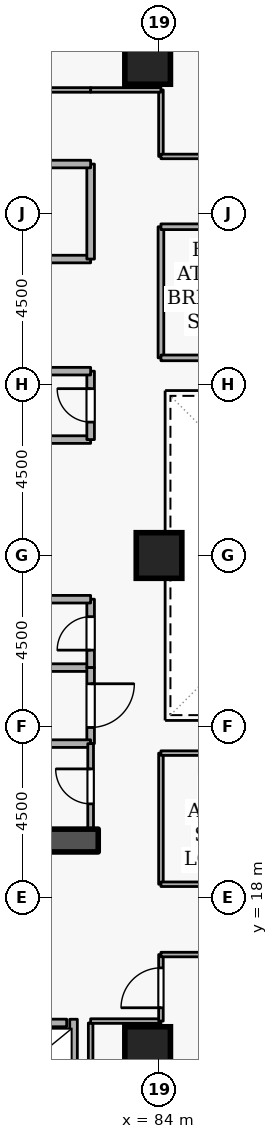
"""IFC4 building model, lengths in metres.
Left out: names, types, materials, properties, quantities, classifications, styles, units other than length and angle.
Written with IfcOpenShell. Run it as: python <this file> out.ifc"""

import sys

from ifc_helpers import new_model, si_unit, direction, frame, frame_2d, origin, origin_2d, place, context, subcontext, project, spatial, rectangle, extrude, element, fill, save


model = new_model("IFC4")
c1 = context("Model", 3, precision=1e-05, world=origin(), true_north=direction((0.0, 1.0)))
c2 = subcontext(c1, "Body", "Model", "MODEL_VIEW")
j1 = project(units=[si_unit("LENGTHUNIT", "METRE"), si_unit("PLANEANGLEUNIT", "RADIAN")], contexts=[c1])
p1 = place(None, origin())
s1 = spatial("IfcSite", under=j1, at=p1, CompositionType="ELEMENT")
p2 = place(p1, origin())
s2 = spatial("IfcBuilding", under=s1, at=p2, CompositionType="ELEMENT")
p3 = place(p2, frame((0.0, 0.0, 112.5)))
s3 = spatial("IfcBuildingStorey", under=s2, at=p3, CompositionType="ELEMENT", Elevation=112.5)
p4 = place(p3, frame((76.7, 19.5, 0.0), z_axis=(0.0, 0.0, 1.0), x_axis=(1.0, 0.0, 0.0)))
e1 = element("IfcWall", 1, at=p4, inside=s3, PredefinedType="SHEAR", context=c2, shape_type="SweptSolid", body=[
    extrude(rectangle(XDim=5.7, YDim=0.6, at=frame_2d((2.85, 0.0))), origin(), (0.0, 0.0, 1.0), 3.6),
])
for number, where, z_axis, x_axis in (
    (2, (83.7, 14.0, 0.0), (0.0, 0.0, 1.0), (1.0, 0.0, 0.0)),
    (3, (83.7, 40.0, 0.0), (0.0, 0.0, 1.0), (1.0, 0.0, 0.0)),
    (4, (84.0, 27.0, 0.0), (0.0, 0.0, 1.0), (1.0, 0.0, 0.0)),
):
    element("IfcColumn", number, at=place(p3, frame(where, z_axis=z_axis, x_axis=x_axis)), inside=s3, PredefinedType="COLUMN", context=c2, shape_type="SweptSolid", body=[
        extrude(rectangle(XDim=1.2, YDim=1.2, at=origin_2d()), origin(), (0.0, 0.0, 1.0), 3.6),
    ])
p5 = place(p3, frame((79.63, 14.7, 0.0), z_axis=(0.0, 0.0, 1.0), x_axis=(1.0, 0.0, 0.0)))
e5 = element("IfcWall", 5, at=p5, inside=s3, PredefinedType="STANDARD", context=c2, shape_type="SweptSolid", body=[
    extrude(rectangle(XDim=1.94, YDim=0.2, at=frame_2d((0.97, 0.0))), origin(), (0.0, 0.0, 1.0), 3.34),
])
p6 = place(p5, frame((0.46, 0.0, 0.0)))
e6 = element("IfcOpeningElement", 6, at=p6, cuts=e5, PredefinedType="OPENING", context=c2, shape_type="SweptSolid", body=[
    extrude(rectangle(XDim=1.02, YDim=2.06, at=frame_2d((0.51, 1.03))), frame((0.0, 0.11, 0.0), z_axis=(0.0, -1.0, 0.0), x_axis=(1.0, 0.0, 0.0)), (0.0, 0.0, 1.0), 0.22),
])
p7 = place(p3, frame((81.75, 12.612, 0.0), z_axis=(0.0, 0.0, 1.0), x_axis=(0.0, 1.0, 0.0)))
e7 = element("IfcWall", 7, at=p7, inside=s3, PredefinedType="STANDARD", context=c2, shape_type="SweptSolid", body=[
    extrude(rectangle(XDim=2.186, YDim=0.2, at=frame_2d((1.093, 0.0))), origin(), (0.0, 0.0, 1.0), 3.34),
])
p8 = place(p3, frame((79.9, 34.8, 0.0), z_axis=(0.0, 0.0, 1.0), x_axis=(1.0, 0.0, 0.0)))
e8 = element("IfcWall", 8, at=p8, inside=s3, PredefinedType="STANDARD", context=c2, shape_type="SweptSolid", body=[
    extrude(rectangle(XDim=2.3, YDim=0.2, at=frame_2d((1.15, 0.0))), origin(), (0.0, 0.0, 1.0), 2.545),
])
p9 = place(p3, frame((82.2, 34.8, 0.0), z_axis=(0.0, 0.0, 1.0), x_axis=(0.0, 1.0, 0.0)))
e9 = element("IfcWall", 9, at=p9, inside=s3, PredefinedType="STANDARD", context=c2, shape_type="SweptSolid", body=[
    extrude(rectangle(XDim=2.5, YDim=0.2, at=frame_2d((1.25, 0.0))), origin(), (0.0, 0.0, 1.0), 3.34),
])
p10 = place(p3, frame((82.2, 37.3, 0.0), z_axis=(0.0, 0.0, 1.0), x_axis=(-1.0, 0.0, 0.0)))
e10 = element("IfcWall", 10, at=p10, inside=s3, PredefinedType="STANDARD", context=c2, shape_type="SweptSolid", body=[
    extrude(rectangle(XDim=5.7, YDim=0.2, at=frame_2d((2.85, 0.0))), origin(), (0.0, 0.0, 1.0), 3.34),
])
p11 = place(p10, frame((2.275, 0.0, 0.0)))
e11 = element("IfcOpeningElement", 11, at=p11, cuts=e10, PredefinedType="OPENING", context=c2, shape_type="SweptSolid", body=[
    extrude(rectangle(XDim=1.15, YDim=2.1, at=frame_2d((0.575, 1.05))), frame((0.0, 0.11, 0.0), z_axis=(0.0, -1.0, 0.0), x_axis=(1.0, 0.0, 0.0)), (0.0, 0.0, 1.0), 0.22),
])
p12 = place(p3, frame((80.15, 24.05, 0.0), z_axis=(0.0, 0.0, 1.0), x_axis=(1.0, 0.0, 0.0)))
e12 = element("IfcWall", 12, at=p12, inside=s3, PredefinedType="STANDARD", context=c2, shape_type="SweptSolid", body=[
    extrude(rectangle(XDim=2.05, YDim=0.2, at=frame_2d((1.025, 0.0))), origin(), (0.0, 0.0, 1.0), 3.34),
])
p13 = place(p3, frame((82.2, 24.05, 0.0), z_axis=(0.0, 0.0, 1.0), x_axis=(0.0, 1.0, 0.0)))
e13 = element("IfcWall", 13, at=p13, inside=s3, PredefinedType="STANDARD", context=c2, shape_type="SweptSolid", body=[
    extrude(rectangle(XDim=1.8, YDim=0.2, at=frame_2d((0.9, 0.0))), origin(), (0.0, 0.0, 1.0), 3.34),
])
p14 = place(p13, frame((0.46, 0.0, 0.0)))
e14 = element("IfcOpeningElement", 14, at=p14, cuts=e13, PredefinedType="OPENING", context=c2, shape_type="SweptSolid", body=[
    extrude(rectangle(XDim=0.88, YDim=2.04, at=frame_2d((0.44, 1.02))), frame((0.0, 0.11, 0.0), z_axis=(0.0, -1.0, 0.0), x_axis=(1.0, 0.0, 0.0)), (0.0, 0.0, 1.0), 0.22),
])
for number, where, z_axis, x_axis in (
    (15, (82.2, 25.85, 0.0), (0.0, 0.0, 1.0), (-1.0, 0.0, 0.0)),
    (16, (80.15, 30.05, 0.0), (0.0, 0.0, 1.0), (1.0, 0.0, 0.0)),
):
    element("IfcWall", number, at=place(p3, frame(where, z_axis=z_axis, x_axis=x_axis)), inside=s3, PredefinedType="STANDARD", context=c2, shape_type="SweptSolid", body=[
        extrude(rectangle(XDim=2.05, YDim=0.2, at=frame_2d((1.025, 0.0))), origin(), (0.0, 0.0, 1.0), 3.34),
    ])
p15 = place(p3, frame((82.2, 30.05, 0.0), z_axis=(0.0, 0.0, 1.0), x_axis=(0.0, 1.0, 0.0)))
e17 = element("IfcWall", 17, at=p15, inside=s3, PredefinedType="STANDARD", context=c2, shape_type="SweptSolid", body=[
    extrude(rectangle(XDim=1.8, YDim=0.2, at=frame_2d((0.9, 0.0))), origin(), (0.0, 0.0, 1.0), 3.34),
])
p16 = place(p15, frame((0.46, 0.0, 0.0)))
e18 = element("IfcOpeningElement", 18, at=p16, cuts=e17, PredefinedType="OPENING", context=c2, shape_type="SweptSolid", body=[
    extrude(rectangle(XDim=0.88, YDim=2.04, at=frame_2d((0.44, 1.02))), frame((0.0, 0.11, 0.0), z_axis=(0.0, -1.0, 0.0), x_axis=(1.0, 0.0, 0.0)), (0.0, 0.0, 1.0), 0.22),
])
p17 = place(p3, frame((82.2, 31.85, 0.0), z_axis=(0.0, 0.0, 1.0), x_axis=(-1.0, 0.0, 0.0)))
e19 = element("IfcWall", 19, at=p17, inside=s3, PredefinedType="STANDARD", context=c2, shape_type="SweptSolid", body=[
    extrude(rectangle(XDim=2.05, YDim=0.2, at=frame_2d((1.025, 0.0))), origin(), (0.0, 0.0, 1.0), 3.34),
])
p18 = place(p3, frame((82.2, 24.05, 0.0), z_axis=(0.0, 0.0, 1.0), x_axis=(0.0, -1.0, 0.0)))
e20 = element("IfcWall", 20, at=p18, inside=s3, PredefinedType="STANDARD", context=c2, shape_type="SweptSolid", body=[
    extrude(rectangle(XDim=2.0, YDim=0.2, at=frame_2d((1.0, 0.0))), origin(), (0.0, 0.0, 1.0), 3.34),
])
p19 = place(p18, frame((0.425, 0.0, 0.0)))
e21 = element("IfcOpeningElement", 21, at=p19, cuts=e20, PredefinedType="OPENING", context=c2, shape_type="SweptSolid", body=[
    extrude(rectangle(XDim=1.15, YDim=2.1, at=frame_2d((0.575, 1.05))), frame((0.0, 0.11, 0.0), z_axis=(0.0, -1.0, 0.0), x_axis=(1.0, 0.0, 0.0)), (0.0, 0.0, 1.0), 0.22),
])
p20 = place(p3, frame((82.2, 22.05, 0.0), z_axis=(0.0, 0.0, 1.0), x_axis=(-1.0, 0.0, 0.0)))
e22 = element("IfcWall", 22, at=p20, inside=s3, PredefinedType="STANDARD", context=c2, shape_type="SweptSolid", body=[
    extrude(rectangle(XDim=2.05, YDim=0.2, at=frame_2d((1.025, 0.0))), origin(), (0.0, 0.0, 1.0), 3.34),
])
p21 = place(p3, frame((82.2, 19.8, 0.0), z_axis=(0.0, 0.0, 1.0), x_axis=(0.0, 1.0, 0.0)))
e23 = element("IfcWall", 23, at=p21, inside=s3, PredefinedType="PARTITIONING", context=c2, shape_type="SweptSolid", body=[
    extrude(rectangle(XDim=2.25, YDim=0.15, at=frame_2d((1.125, 0.0))), origin(), (0.0, 0.0, 1.0), 3.34),
])
p22 = place(p21, frame((0.665, 0.0, 0.0)))
e24 = element("IfcOpeningElement", 24, at=p22, cuts=e23, PredefinedType="OPENING", context=c2, shape_type="SweptSolid", body=[
    extrude(rectangle(XDim=0.92, YDim=2.08, at=frame_2d((0.46, 1.04))), frame((0.0, 0.085, 0.0), z_axis=(0.0, -1.0, 0.0), x_axis=(1.0, 0.0, 0.0)), (0.0, 0.0, 1.0), 0.17),
])
p23 = place(p3, frame((82.2, 12.4, 0.0), z_axis=(0.0, 0.0, 1.0), x_axis=(0.0, 1.0, 0.0)))
e25 = element("IfcWall", 25, at=p23, inside=s3, PredefinedType="PARTITIONING", context=c2, shape_type="SweptSolid", body=[
    extrude(rectangle(XDim=2.3, YDim=0.12, at=frame_2d((1.15, 0.0))), origin(), (0.0, 0.0, 1.0), 3.34),
])
p24 = place(p3, frame((82.2, 14.75, 0.0), z_axis=(0.0, 0.0, 1.0), x_axis=(1.0, 0.0, 0.0)))
e26 = element("IfcWall", 26, at=p24, inside=s3, PredefinedType="PARTITIONING", context=c2, shape_type="SweptSolid", body=[
    extrude(rectangle(XDim=1.85, YDim=0.12, at=frame_2d((0.925, 0.0))), origin(), (0.0, 0.0, 1.0), 3.34),
])
p25 = place(p3, frame((84.05, 14.75, 0.0), z_axis=(0.0, 0.0, 1.0), x_axis=(0.0, 1.0, 0.0)))
e27 = element("IfcWall", 27, at=p25, inside=s3, PredefinedType="PARTITIONING", context=c2, shape_type="SweptSolid", body=[
    extrude(rectangle(XDim=1.75, YDim=0.12, at=frame_2d((0.875, 0.0))), origin(), (0.0, 0.0, 1.0), 3.34),
])
p26 = place(p25, frame((0.35, 0.0, 0.0)))
e28 = element("IfcOpeningElement", 28, at=p26, cuts=e27, PredefinedType="OPENING", context=c2, shape_type="SweptSolid", body=[
    extrude(rectangle(XDim=1.05, YDim=2.1, at=frame_2d((0.525, 1.05))), frame((0.0, 0.07, 0.0), z_axis=(0.0, -1.0, 0.0), x_axis=(1.0, 0.0, 0.0)), (0.0, 0.0, 1.0), 0.14),
])
p27 = place(p3, frame((84.05, 16.5, 0.0), z_axis=(0.0, 0.0, 1.0), x_axis=(1.0, 0.0, 0.0)))
e29 = element("IfcWall", 29, at=p27, inside=s3, PredefinedType="PARTITIONING", context=c2, shape_type="SweptSolid", body=[
    extrude(rectangle(XDim=1.3, YDim=0.12, at=frame_2d((0.65, 0.0))), origin(), (0.0, 0.0, 1.0), 3.34),
])
p28 = place(p3, frame((84.05, 37.5, 0.0), z_axis=(0.0, 0.0, 1.0), x_axis=(0.0, 1.0, 0.0)))
e30 = element("IfcWall", 30, at=p28, inside=s3, PredefinedType="PARTITIONING", context=c2, shape_type="SweptSolid", body=[
    extrude(rectangle(XDim=1.75, YDim=0.12, at=frame_2d((0.875, 0.0))), origin(), (0.0, 0.0, 1.0), 3.34),
])
p29 = place(p3, frame((84.05, 39.25, 0.0), z_axis=(0.0, 0.0, 1.0), x_axis=(-1.0, 0.0, 0.0)))
e31 = element("IfcWall", 31, at=p29, inside=s3, PredefinedType="PARTITIONING", context=c2, shape_type="SweptSolid", body=[
    extrude(rectangle(XDim=1.85, YDim=0.12, at=frame_2d((0.925, 0.0))), origin(), (0.0, 0.0, 1.0), 3.34),
])
p30 = place(p3, frame((82.2, 39.25, 0.0), z_axis=(0.0, 0.0, 1.0), x_axis=(-1.0, 0.0, 0.0)))
e32 = element("IfcWall", 32, at=p30, inside=s3, PredefinedType="PARTITIONING", context=c2, shape_type="SweptSolid", body=[
    extrude(rectangle(XDim=9.35, YDim=0.12, at=frame_2d((4.675, 0.0))), origin(), (0.0, 0.0, 1.0), 3.34),
])
p31 = place(p30, frame((4.2, 0.0, 0.0)))
e33 = element("IfcOpeningElement", 33, at=p31, cuts=e32, PredefinedType="OPENING", context=c2, shape_type="SweptSolid", body=[
    extrude(rectangle(XDim=0.95, YDim=2.1, at=frame_2d((0.475, 1.05))), frame((0.0, 0.07, 0.0), z_axis=(0.0, -1.0, 0.0), x_axis=(1.0, 0.0, 0.0)), (0.0, 0.0, 1.0), 0.14),
])
p32 = place(p3, frame((85.35, 37.5, 0.0), z_axis=(0.0, 0.0, 1.0), x_axis=(-1.0, 0.0, 0.0)))
e34 = element("IfcWall", 34, at=p32, inside=s3, PredefinedType="PARTITIONING", context=c2, shape_type="SweptSolid", body=[
    extrude(rectangle(XDim=1.3, YDim=0.12, at=frame_2d((0.65, 0.0))), origin(), (0.0, 0.0, 1.0), 3.34),
])
p33 = place(p3, frame((84.05, 32.2, 0.0), z_axis=(0.0, 0.0, 1.0), x_axis=(0.0, 1.0, 0.0)))
e35 = element("IfcWall", 35, at=p33, inside=s3, PredefinedType="PARTITIONING", context=c2, shape_type="SweptSolid", body=[
    extrude(rectangle(XDim=3.45, YDim=0.15, at=frame_2d((1.725, 0.0))), origin(), (0.0, 0.0, 1.0), 3.34),
])
p34 = place(p3, frame((84.05, 35.65, 0.0), z_axis=(0.0, 0.0, 1.0), x_axis=(1.0, 0.0, 0.0)))
e36 = element("IfcWall", 36, at=p34, inside=s3, PredefinedType="PARTITIONING", context=c2, shape_type="SweptSolid", body=[
    extrude(rectangle(XDim=8.9, YDim=0.15, at=frame_2d((4.45, 0.0))), origin(), (0.0, 0.0, 1.0), 3.34),
])
p35 = place(p34, frame((3.8, 0.0, 0.0)))
e37 = element("IfcOpeningElement", 37, at=p35, cuts=e36, PredefinedType="OPENING", context=c2, shape_type="SweptSolid", body=[
    extrude(rectangle(XDim=1.3, YDim=2.12, at=frame_2d((0.65, 1.06))), frame((0.0, 0.085, 0.0), z_axis=(0.0, -1.0, 0.0), x_axis=(1.0, 0.0, 0.0)), (0.0, 0.0, 1.0), 0.17),
])
p36 = place(p3, frame((92.95, 32.2, 0.0), z_axis=(0.0, 0.0, 1.0), x_axis=(-1.0, 0.0, 0.0)))
e38 = element("IfcWall", 38, at=p36, inside=s3, PredefinedType="PARTITIONING", context=c2, shape_type="SweptSolid", body=[
    extrude(rectangle(XDim=8.9, YDim=0.15, at=frame_2d((4.45, 0.0))), origin(), (0.0, 0.0, 1.0), 3.34),
])
p37 = place(p3, frame((84.05, 18.35, 0.0), z_axis=(0.0, 0.0, 1.0), x_axis=(0.0, 1.0, 0.0)))
e39 = element("IfcWall", 39, at=p37, inside=s3, PredefinedType="PARTITIONING", context=c2, shape_type="SweptSolid", body=[
    extrude(rectangle(XDim=3.45, YDim=0.12, at=frame_2d((1.725, 0.0))), origin(), (0.0, 0.0, 1.0), 3.34),
])
p38 = place(p3, frame((84.05, 21.8, 0.0), z_axis=(0.0, 0.0, 1.0), x_axis=(1.0, 0.0, 0.0)))
e40 = element("IfcWall", 40, at=p38, inside=s3, PredefinedType="PARTITIONING", context=c2, shape_type="SweptSolid", body=[
    extrude(rectangle(XDim=8.9, YDim=0.12, at=frame_2d((4.45, 0.0))), origin(), (0.0, 0.0, 1.0), 3.34),
])
p39 = place(p3, frame((92.95, 18.35, 0.0), z_axis=(0.0, 0.0, 1.0), x_axis=(-1.0, 0.0, 0.0)))
e41 = element("IfcWall", 41, at=p39, inside=s3, PredefinedType="PARTITIONING", context=c2, shape_type="SweptSolid", body=[
    extrude(rectangle(XDim=8.9, YDim=0.12, at=frame_2d((4.45, 0.0))), origin(), (0.0, 0.0, 1.0), 3.34),
])
p40 = place(p39, frame((3.975, 0.0, 0.0)))
e42 = element("IfcOpeningElement", 42, at=p40, cuts=e41, PredefinedType="OPENING", context=c2, shape_type="SweptSolid", body=[
    extrude(rectangle(XDim=0.95, YDim=2.1, at=frame_2d((0.475, 1.05))), frame((0.0, 0.07, 0.0), z_axis=(0.0, -1.0, 0.0), x_axis=(1.0, 0.0, 0.0)), (0.0, 0.0, 1.0), 0.14),
])
p41 = place(p14, origin())
e43 = element("IfcDoor", 43, at=p41, inside=s3, OperationType="SINGLE_SWING_LEFT", PredefinedType="DOOR", context=c2, shape_type="SweptSolid", body=[
    extrude(rectangle(XDim=0.88, YDim=2.04, at=frame_2d((0.44, 1.02))), frame((0.0, 0.025, 0.0), z_axis=(0.0, -1.0, 0.0), x_axis=(1.0, 0.0, 0.0)), (0.0, 0.0, 1.0), 0.05),
])
fill(e14, e43)
p42 = place(p16, origin())
e44 = element("IfcDoor", 44, at=p42, inside=s3, OperationType="SINGLE_SWING_RIGHT", PredefinedType="DOOR", context=c2, shape_type="SweptSolid", body=[
    extrude(rectangle(XDim=0.88, YDim=2.04, at=frame_2d((0.44, 1.02))), frame((0.0, 0.025, 0.0), z_axis=(0.0, -1.0, 0.0), x_axis=(1.0, 0.0, 0.0)), (0.0, 0.0, 1.0), 0.05),
])
fill(e18, e44)
p43 = place(p22, origin())
e45 = element("IfcDoor", 45, at=p43, inside=s3, OperationType="SINGLE_SWING_RIGHT", PredefinedType="DOOR", context=c2, shape_type="SweptSolid", body=[
    extrude(rectangle(XDim=0.92, YDim=2.08, at=frame_2d((0.46, 1.04))), frame((0.0, 0.025, 0.0), z_axis=(0.0, -1.0, 0.0), x_axis=(1.0, 0.0, 0.0)), (0.0, 0.0, 1.0), 0.05),
])
fill(e24, e45)
p44 = place(p19, origin())
e46 = element("IfcDoor", 46, at=p44, inside=s3, OperationType="SINGLE_SWING_LEFT", PredefinedType="DOOR", context=c2, shape_type="SweptSolid", body=[
    extrude(rectangle(XDim=1.15, YDim=2.1, at=frame_2d((0.575, 1.05))), frame((0.0, 0.025, 0.0), z_axis=(0.0, -1.0, 0.0), x_axis=(1.0, 0.0, 0.0)), (0.0, 0.0, 1.0), 0.05),
])
fill(e21, e46)
p45 = place(p26, origin())
e47 = element("IfcDoor", 47, at=p45, inside=s3, OperationType="SINGLE_SWING_LEFT", PredefinedType="DOOR", context=c2, shape_type="SweptSolid", body=[
    extrude(rectangle(XDim=1.05, YDim=2.1, at=frame_2d((0.525, 1.05))), frame((0.0, 0.025, 0.0), z_axis=(0.0, -1.0, 0.0), x_axis=(1.0, 0.0, 0.0)), (0.0, 0.0, 1.0), 0.05),
])
fill(e28, e47)
save(model, sys.argv[1])
